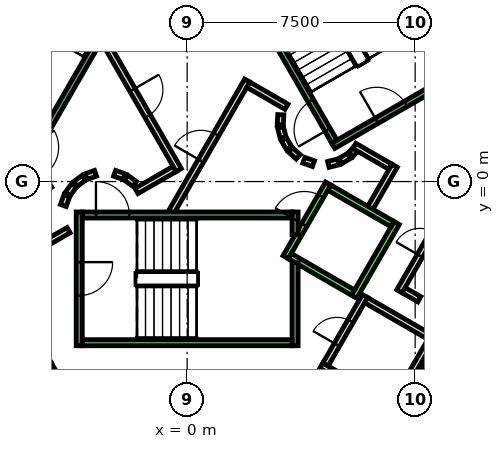
"""IFC4 building model, lengths in metres.
Left out: names, types, materials, properties, quantities, classifications, styles, units other than length and angle.
Written with IfcOpenShell. Run it as: python <this file> out.ifc"""

import sys

from ifc_helpers import new_model, si_unit, direction, frame, frame_2d, origin, place, context, subcontext, project, spatial, polyline, rectangle, outline, extrude, element, fill, save


model = new_model("IFC4")
c1 = context("Model", 3, precision=1e-05, world=origin(), true_north=direction((0.0, 1.0)))
c2 = subcontext(c1, "Body", "Model", "MODEL_VIEW")
j1 = project(units=[si_unit("LENGTHUNIT", "METRE"), si_unit("PLANEANGLEUNIT", "RADIAN")], contexts=[c1])
p1 = place(None, origin())
s1 = spatial("IfcSite", under=j1, at=p1, CompositionType="ELEMENT")
p2 = place(p1, origin())
s2 = spatial("IfcBuilding", under=s1, at=p2, CompositionType="ELEMENT")
p3 = place(p2, frame((0.0, 0.0, -11.0)))
s3 = spatial("IfcBuildingStorey", under=s2, at=p3, CompositionType="ELEMENT", Elevation=-11.0)
p4 = place(p3, frame((0.0, 0.0, -0.42)))
e1 = element("IfcWall", 1, at=p4, inside=s3, PredefinedType="SHEAR", context=c2, shape_type="SweptSolid", body=[
    extrude(outline(polyline([(8.517, 11.748), (7.651, 11.248), (12.702, 2.5), (13.856, 2.5), (8.517, 11.748)])), origin(), (0.0, 0.0, 1.0), 5.5),
])
p5 = place(p3, frame((0.0, 0.0, -0.42)))
e2 = element("IfcWall", 2, at=p5, inside=s3, PredefinedType="SHEAR", context=c2, shape_type="SweptSolid", body=[
    extrude(outline(polyline([(6.928, -9.5), (13.856, 2.5), (12.702, 2.5), (6.351, -8.5), (6.928, -9.5)])), origin(), (0.0, 0.0, 1.0), 5.5),
])
p6 = place(p3, frame((6.84, -7.453, 0.0), z_axis=(0.0, 0.0, 1.0), x_axis=(-0.866056369097, 0.49994636267, 0.0)))
e3 = element("IfcWall", 3, at=p6, inside=s3, PredefinedType="PARTITIONING", context=c2, shape_type="SweptSolid", body=[
    extrude(rectangle(XDim=2.8, YDim=0.2, at=frame_2d((1.4, 0.0))), origin(), (0.0, 0.0, 1.0), 5.05),
])
p7 = place(p3, frame((4.551, -6.017, 0.0), z_axis=(0.0, 0.0, 1.0), x_axis=(0.499925626596, 0.866068339032, 0.0)))
e4 = element("IfcWall", 4, at=p7, inside=s3, PredefinedType="PARTITIONING", context=c2, shape_type="SweptSolid", body=[
    extrude(rectangle(XDim=2.601, YDim=0.2, at=frame_2d((1.3, 0.0))), origin(), (0.0, 0.0, 1.0), 5.05),
])
p8 = place(p7, frame((0.75, 0.0, 0.0)))
e5 = element("IfcOpeningElement", 5, at=p8, cuts=e4, PredefinedType="OPENING", context=c2, shape_type="SweptSolid", body=[
    extrude(rectangle(XDim=0.9, YDim=2.1, at=frame_2d((0.45, 1.05))), frame((0.0, 0.11, 0.0), z_axis=(0.0, -1.0, 0.0), x_axis=(1.0, 0.0, 0.0)), (0.0, 0.0, 1.0), 0.22),
])
p9 = place(p3, frame((5.888, -3.902, 0.0), z_axis=(0.0, 0.0, 1.0), x_axis=(0.866022959057, -0.500004234368, 0.0)))
e6 = element("IfcWall", 6, at=p9, inside=s3, PredefinedType="PARTITIONING", context=c2, shape_type="SweptSolid", body=[
    extrude(rectangle(XDim=2.5, YDim=0.2, at=frame_2d((1.25, 0.0))), origin(), (0.0, 0.0, 1.0), 5.05),
])
p10 = place(p3, frame((8.103, -5.065, 0.0), z_axis=(0.0, 0.0, 1.0), x_axis=(-0.49996627774, -0.866044872465, 0.0)))
e7 = element("IfcWall", 7, at=p10, inside=s3, PredefinedType="PARTITIONING", context=c2, shape_type="SweptSolid", body=[
    extrude(rectangle(XDim=2.6, YDim=0.2, at=frame_2d((1.3, 0.0))), origin(), (0.0, 0.0, 1.0), 5.05),
])
p11 = place(p3, frame((7.637, -3.872, 0.0), z_axis=(0.0, 0.0, 1.0), x_axis=(-0.866158505053, 0.499769390944, 0.0)))
e8 = element("IfcWall", 8, at=p11, inside=s3, PredefinedType="PARTITIONING", context=c2, shape_type="SweptSolid", body=[
    extrude(rectangle(XDim=0.6, YDim=0.2, at=frame_2d((0.3, 0.0))), origin(), (0.0, 0.0, 1.0), 5.05),
])
p12 = place(p3, frame((6.981, -3.609, 0.0), z_axis=(0.0, 0.0, 1.0), x_axis=(0.499982693035, 0.866035395735, 0.0)))
e9 = element("IfcWall", 9, at=p12, inside=s3, PredefinedType="PARTITIONING", context=c2, shape_type="SweptSolid", body=[
    extrude(rectangle(XDim=3.6, YDim=0.2, at=frame_2d((1.8, 0.0))), origin(), (0.0, 0.0, 1.0), 5.05),
])
p13 = place(p12, frame((1.35, 0.0, 0.0)))
e10 = element("IfcOpeningElement", 10, at=p13, cuts=e9, PredefinedType="OPENING", context=c2, shape_type="SweptSolid", body=[
    extrude(rectangle(XDim=0.9, YDim=2.1, at=frame_2d((0.45, 1.05))), frame((0.0, 0.11, 0.0), z_axis=(0.0, -1.0, 0.0), x_axis=(1.0, 0.0, 0.0)), (0.0, 0.0, 1.0), 0.22),
])
p14 = place(p3, frame((-4.415, -6.053, 0.0), z_axis=(0.0, 0.0, 1.0), x_axis=(-0.866056369097, -0.49994636267, 0.0)))
e11 = element("IfcWall", 11, at=p14, inside=s3, PredefinedType="PARTITIONING", context=c2, shape_type="SweptSolid", body=[
    extrude(rectangle(XDim=2.8, YDim=0.2, at=frame_2d((1.4, 0.0))), origin(), (0.0, 0.0, 1.0), 5.05),
])
p15 = place(p3, frame((3.079, 2.199, 0.0), z_axis=(0.0, 0.0, 1.0), x_axis=(-0.047771483479, -0.998858290933, 0.0)))
e12 = element("IfcWall", 12, at=p15, inside=s3, PredefinedType="PARTITIONING", context=c2, shape_type="SweptSolid", body=[
    extrude(rectangle(XDim=0.337, YDim=0.2, at=frame_2d((0.169, 0.0))), origin(), (0.0, 0.0, 1.0), 5.05),
])
p16 = place(p3, frame((3.07, 1.786, 0.0), z_axis=(0.0, 0.0, 1.0), x_axis=(0.242705583207, -0.970099994784, 0.0)))
e13 = element("IfcWall", 13, at=p16, inside=s3, PredefinedType="PARTITIONING", context=c2, shape_type="SweptSolid", body=[
    extrude(rectangle(XDim=0.338, YDim=0.2, at=frame_2d((0.169, 0.0))), origin(), (0.0, 0.0, 1.0), 5.05),
])
for number, where, z_axis, x_axis in (
    (14, (3.182, 1.388, 0.0), (0.0, 0.0, 1.0), (0.512, -0.859, 0.0)),
    (15, (3.404, 1.039, 0.0), (0.0, 0.0, 1.0), (0.74, -0.672, 0.0)),
):
    element("IfcWall", number, at=place(p3, frame(where, z_axis=z_axis, x_axis=x_axis)), inside=s3, PredefinedType="PARTITIONING", context=c2, shape_type="SweptSolid", body=[
        extrude(rectangle(XDim=0.338, YDim=0.2, at=frame_2d((0.169, 0.0))), origin(), (0.0, 0.0, 1.0), 5.05),
    ])
p17 = place(p3, frame((3.838, 0.702, 0.0), z_axis=(0.0, 0.0, 1.0), x_axis=(0.941035081519, -0.338308993895, 0.0)))
e16 = element("IfcWall", 16, at=p17, inside=s3, PredefinedType="PARTITIONING", context=c2, shape_type="SweptSolid", body=[
    extrude(rectangle(XDim=0.337, YDim=0.2, at=frame_2d((0.168, 0.0))), origin(), (0.0, 0.0, 1.0), 5.05),
])
p18 = place(p3, frame((4.644, 0.564, 0.0), z_axis=(0.0, 0.0, 1.0), x_axis=(0.969929076366, 0.243387729394, 0.0)))
e17 = element("IfcWall", 17, at=p18, inside=s3, PredefinedType="PARTITIONING", context=c2, shape_type="SweptSolid", body=[
    extrude(rectangle(XDim=0.337, YDim=0.2, at=frame_2d((0.168, 0.0))), origin(), (0.0, 0.0, 1.0), 5.05),
])
p19 = place(p3, frame((5.042, 0.676, 0.0), z_axis=(0.0, 0.0, 1.0), x_axis=(0.857940155512, 0.513749637042, 0.0)))
e18 = element("IfcWall", 18, at=p19, inside=s3, PredefinedType="PARTITIONING", context=c2, shape_type="SweptSolid", body=[
    extrude(rectangle(XDim=0.337, YDim=0.2, at=frame_2d((0.168, 0.0))), origin(), (0.0, 0.0, 1.0), 5.05),
])
p20 = place(p3, frame((5.39, 0.898, 0.0), z_axis=(0.0, 0.0, 1.0), x_axis=(0.673828488714, 0.738887791073, 0.0)))
e19 = element("IfcWall", 19, at=p20, inside=s3, PredefinedType="PARTITIONING", context=c2, shape_type="SweptSolid", body=[
    extrude(rectangle(XDim=0.263, YDim=0.2, at=frame_2d((0.131, 0.0))), origin(), (0.0, 0.0, 1.0), 5.05),
])
p21 = place(p3, frame((5.499, 1.172, 0.0), z_axis=(0.0, 0.0, 1.0), x_axis=(0.866333505267, -0.499465972466, 0.0)))
e20 = element("IfcWall", 20, at=p21, inside=s3, PredefinedType="PARTITIONING", context=c2, shape_type="SweptSolid", body=[
    extrude(rectangle(XDim=1.374, YDim=0.2, at=frame_2d((0.687, 0.0))), origin(), (0.0, 0.0, 1.0), 5.05),
])
p22 = place(p3, frame((6.826, 0.522, 0.0), z_axis=(0.0, 0.0, 1.0), x_axis=(-0.500016722714, -0.866015748706, 0.0)))
e21 = element("IfcWall", 21, at=p22, inside=s3, PredefinedType="PARTITIONING", context=c2, shape_type="SweptSolid", body=[
    extrude(rectangle(XDim=1.7, YDim=0.2, at=frame_2d((0.85, 0.0))), origin(), (0.0, 0.0, 1.0), 5.05),
])
p23 = place(p3, frame((-0.52, -1.0, 0.0), z_axis=(0.0, 0.0, 1.0), x_axis=(0.50011622646, 0.865958290007, 0.0)))
e22 = element("IfcWall", 22, at=p23, inside=s3, PredefinedType="PARTITIONING", context=c2, shape_type="SweptSolid", body=[
    extrude(rectangle(XDim=4.991, YDim=0.2, at=frame_2d((2.496, 0.0))), origin(), (0.0, 0.0, 1.0), 5.05),
])
p24 = place(p23, frame((1.945, 0.0, 0.0)))
e23 = element("IfcOpeningElement", 23, at=p24, cuts=e22, PredefinedType="OPENING", context=c2, shape_type="SweptSolid", body=[
    extrude(rectangle(XDim=1.0, YDim=2.1, at=frame_2d((0.5, 1.05))), frame((0.0, 0.11, 0.0), z_axis=(0.0, -1.0, 0.0), x_axis=(1.0, 0.0, 0.0)), (0.0, 0.0, 1.0), 0.22),
])
p25 = place(p3, frame((2.012, 3.186, 0.0), z_axis=(0.0, 0.0, 1.0), x_axis=(0.865891012941, -0.500232699559, 0.0)))
e24 = element("IfcWall", 24, at=p25, inside=s3, PredefinedType="PARTITIONING", context=c2, shape_type="SweptSolid", body=[
    extrude(rectangle(XDim=1.449, YDim=0.2, at=frame_2d((0.725, 0.0))), origin(), (0.0, 0.0, 1.0), 5.05),
])
p26 = place(p3, frame((-0.412, 0.414, 0.0), z_axis=(0.0, 0.0, 1.0), x_axis=(-0.866017369001, -0.500013916395, 0.0)))
e25 = element("IfcWall", 25, at=p26, inside=s3, PredefinedType="PARTITIONING", context=c2, shape_type="SweptSolid", body=[
    extrude(rectangle(XDim=1.45, YDim=0.2, at=frame_2d((0.725, 0.0))), origin(), (0.0, 0.0, 1.0), 5.05),
])
p27 = place(p3, frame((-1.731, -0.077, 0.0), z_axis=(0.0, 0.0, 1.0), x_axis=(-0.804311165252, 0.594208338422, 0.0)))
e26 = element("IfcWall", 26, at=p27, inside=s3, PredefinedType="PARTITIONING", context=c2, shape_type="SweptSolid", body=[
    extrude(rectangle(XDim=0.338, YDim=0.2, at=frame_2d((0.169, 0.0))), origin(), (0.0, 0.0, 1.0), 5.05),
])
p28 = place(p3, frame((-2.07, 0.16, 0.0), z_axis=(0.0, 0.0, 1.0), x_axis=(-0.942199461132, 0.335052496547, 0.0)))
e27 = element("IfcWall", 27, at=p28, inside=s3, PredefinedType="PARTITIONING", context=c2, shape_type="SweptSolid", body=[
    extrude(rectangle(XDim=0.337, YDim=0.2, at=frame_2d((0.169, 0.0))), origin(), (0.0, 0.0, 1.0), 5.05),
])
p29 = place(p3, frame((-3.012, 0.273, 0.0), z_axis=(0.0, 0.0, 1.0), x_axis=(-0.942280615813, -0.334824194261, 0.0)))
e28 = element("IfcWall", 28, at=p29, inside=s3, PredefinedType="PARTITIONING", context=c2, shape_type="SweptSolid", body=[
    extrude(rectangle(XDim=0.338, YDim=0.2, at=frame_2d((0.169, 0.0))), origin(), (0.0, 0.0, 1.0), 5.05),
])
p30 = place(p3, frame((-3.397, 0.124, 0.0), z_axis=(0.0, 0.0, 1.0), x_axis=(-0.804311165252, -0.594208338422, 0.0)))
e29 = element("IfcWall", 29, at=p30, inside=s3, PredefinedType="PARTITIONING", context=c2, shape_type="SweptSolid", body=[
    extrude(rectangle(XDim=0.338, YDim=0.2, at=frame_2d((0.169, 0.0))), origin(), (0.0, 0.0, 1.0), 5.05),
])
p31 = place(p3, frame((-3.723, -0.131, 0.0), z_axis=(0.0, 0.0, 1.0), x_axis=(-0.594675113454, -0.803966112121, 0.0)))
e30 = element("IfcWall", 30, at=p31, inside=s3, PredefinedType="PARTITIONING", context=c2, shape_type="SweptSolid", body=[
    extrude(rectangle(XDim=0.338, YDim=0.2, at=frame_2d((0.169, 0.0))), origin(), (0.0, 0.0, 1.0), 5.05),
])
p32 = place(p3, frame((-3.96, -0.47, 0.0), z_axis=(0.0, 0.0, 1.0), x_axis=(-0.334824194261, -0.942280615813, 0.0)))
e31 = element("IfcWall", 31, at=p32, inside=s3, PredefinedType="PARTITIONING", context=c2, shape_type="SweptSolid", body=[
    extrude(rectangle(XDim=0.338, YDim=0.2, at=frame_2d((0.169, 0.0))), origin(), (0.0, 0.0, 1.0), 5.05),
])
p33 = place(p3, frame((-3.9, -1.599, 0.0), z_axis=(0.0, 0.0, 1.0), x_axis=(-0.865969445389, -0.500096910261, 0.0)))
e32 = element("IfcWall", 32, at=p33, inside=s3, PredefinedType="PARTITIONING", context=c2, shape_type="SweptSolid", body=[
    extrude(rectangle(XDim=1.373, YDim=0.2, at=frame_2d((0.687, 0.0))), origin(), (0.0, 0.0, 1.0), 5.05),
])
p34 = place(p3, frame((-2.771, 4.7, 0.0), z_axis=(0.0, 0.0, 1.0), x_axis=(0.499969479948, -0.866043023828, 0.0)))
e33 = element("IfcWall", 33, at=p34, inside=s3, PredefinedType="PARTITIONING", context=c2, shape_type="SweptSolid", body=[
    extrude(rectangle(XDim=4.99, YDim=0.2, at=frame_2d((2.495, 0.0))), origin(), (0.0, 0.0, 1.0), 5.05),
])
p35 = place(p34, frame((1.945, 0.0, 0.0)))
e34 = element("IfcOpeningElement", 34, at=p35, cuts=e33, PredefinedType="OPENING", context=c2, shape_type="SweptSolid", body=[
    extrude(rectangle(XDim=1.0, YDim=2.1, at=frame_2d((0.5, 1.05))), frame((0.0, 0.11, 0.0), z_axis=(0.0, -1.0, 0.0), x_axis=(1.0, 0.0, 0.0)), (0.0, 0.0, 1.0), 0.22),
])
p36 = place(p3, frame((3.24, -2.488, 0.0), z_axis=(0.0, 0.0, 1.0), x_axis=(0.49994636267, 0.866056369097, 0.0)))
e35 = element("IfcWall", 35, at=p36, inside=s3, PredefinedType="STANDARD", context=c2, shape_type="SweptSolid", body=[
    extrude(rectangle(XDim=2.8, YDim=0.2, at=frame_2d((1.4, 0.0))), origin(), (0.0, 0.0, 1.0), 5.05),
])
p37 = place(p36, frame((1.225, 0.0, 0.0)))
e36 = element("IfcOpeningElement", 36, at=p37, cuts=e35, PredefinedType="OPENING", context=c2, shape_type="SweptSolid", body=[
    extrude(rectangle(XDim=1.1, YDim=2.1, at=frame_2d((0.55, 1.05))), frame((0.0, 0.11, 0.0), z_axis=(0.0, -1.0, 0.0), x_axis=(1.0, 0.0, 0.0)), (0.0, 0.0, 1.0), 0.22),
])
p38 = place(p3, frame((5.492, -3.788, 0.0), z_axis=(0.0, 0.0, 1.0), x_axis=(0.500011755427, 0.866018616679, 0.0)))
e37 = element("IfcWall", 37, at=p38, inside=s3, PredefinedType="STANDARD", context=c2, shape_type="SweptSolid", body=[
    extrude(rectangle(XDim=2.8, YDim=0.2, at=frame_2d((1.4, 0.0))), origin(), (0.0, 0.0, 1.0), 5.05),
])
p39 = place(p3, frame((3.377, -2.452, 0.0), z_axis=(0.0, 0.0, 1.0), x_axis=(0.865955154139, -0.50012165622, 0.0)))
e38 = element("IfcWall", 38, at=p39, inside=s3, PredefinedType="STANDARD", context=c2, shape_type="SweptSolid", body=[
    extrude(rectangle(XDim=2.4, YDim=0.2, at=frame_2d((1.2, 0.0))), origin(), (0.0, 0.0, 1.0), 5.05),
])
p40 = place(p3, frame((4.677, -0.2, 0.0), z_axis=(0.0, 0.0, 1.0), x_axis=(0.865973769406, -0.500089422704, 0.0)))
e39 = element("IfcWall", 39, at=p40, inside=s3, PredefinedType="STANDARD", context=c2, shape_type="SweptSolid", body=[
    extrude(rectangle(XDim=2.399, YDim=0.2, at=frame_2d((1.2, 0.0))), origin(), (0.0, 0.0, 1.0), 5.05),
])
p41 = place(p3, frame((-3.55, -1.0, 0.0), z_axis=(0.0, 0.0, 1.0), x_axis=(0.0, -1.0, 0.0)))
e40 = element("IfcWall", 40, at=p41, inside=s3, PredefinedType="STANDARD", context=c2, shape_type="SweptSolid", body=[
    extrude(rectangle(XDim=4.4, YDim=0.2, at=frame_2d((2.2, 0.0))), origin(), (0.0, 0.0, 1.0), 5.05),
])
p42 = place(p41, frame((1.65, 0.0, 0.0)))
e41 = element("IfcOpeningElement", 41, at=p42, cuts=e40, PredefinedType="OPENING", context=c2, shape_type="SweptSolid", body=[
    extrude(rectangle(XDim=1.1, YDim=2.2, at=frame_2d((0.55, 1.1))), frame((0.0, 0.11, 0.0), z_axis=(0.0, -1.0, 0.0), x_axis=(1.0, 0.0, 0.0)), (0.0, 0.0, 1.0), 0.22),
])
p43 = place(p3, frame((3.55, -2.667, 0.0), z_axis=(0.0, 0.0, 1.0), x_axis=(0.0, -1.0, 0.0)))
e42 = element("IfcWall", 42, at=p43, inside=s3, PredefinedType="STANDARD", context=c2, shape_type="SweptSolid", body=[
    extrude(rectangle(XDim=2.733, YDim=0.2, at=frame_2d((1.366, 0.0))), origin(), (0.0, 0.0, 1.0), 5.05),
])
p44 = place(p3, frame((3.55, -1.0, 0.0), z_axis=(0.0, 0.0, 1.0), x_axis=(0.0, -1.0, 0.0)))
e43 = element("IfcWall", 43, at=p44, inside=s3, PredefinedType="STANDARD", context=c2, shape_type="SweptSolid", body=[
    extrude(rectangle(XDim=0.751, YDim=0.2, at=frame_2d((0.375, 0.0))), origin(), (0.0, 0.0, 1.0), 5.05),
])
p45 = place(p3, frame((-3.45, -1.1, 0.0), z_axis=(0.0, 0.0, 1.0), x_axis=(1.0, 0.0, 0.0)))
e44 = element("IfcWall", 44, at=p45, inside=s3, PredefinedType="STANDARD", context=c2, shape_type="SweptSolid", body=[
    extrude(rectangle(XDim=6.9, YDim=0.2, at=frame_2d((3.45, 0.0))), origin(), (0.0, 0.0, 1.0), 5.05),
])
p46 = place(p45, frame((0.45, 0.0, 0.0)))
e45 = element("IfcOpeningElement", 45, at=p46, cuts=e44, PredefinedType="OPENING", context=c2, shape_type="SweptSolid", body=[
    extrude(rectangle(XDim=1.1, YDim=2.2, at=frame_2d((0.55, 1.1))), frame((0.0, 0.11, 0.0), z_axis=(0.0, -1.0, 0.0), x_axis=(1.0, 0.0, 0.0)), (0.0, 0.0, 1.0), 0.22),
])
p47 = place(p3, frame((-3.45, -5.3, 0.0), z_axis=(0.0, 0.0, 1.0), x_axis=(1.0, 0.0, 0.0)))
e46 = element("IfcWall", 46, at=p47, inside=s3, PredefinedType="STANDARD", context=c2, shape_type="SweptSolid", body=[
    extrude(rectangle(XDim=6.9, YDim=0.2, at=frame_2d((3.45, 0.0))), origin(), (0.0, 0.0, 1.0), 5.05),
])
p48 = place(p3, frame((4.806, 1.176, 0.0), z_axis=(0.0, 0.0, 1.0), x_axis=(0.866059941101, 0.499940174841, 0.0)))
e47 = element("IfcWall", 47, at=p48, inside=s3, PredefinedType="STANDARD", context=c2, shape_type="SweptSolid", body=[
    extrude(rectangle(XDim=4.4, YDim=0.2, at=frame_2d((2.2, 0.0))), origin(), (0.0, 0.0, 1.0), 5.05),
])
p49 = place(p48, frame((1.65, 0.0, 0.0)))
e48 = element("IfcOpeningElement", 48, at=p49, cuts=e47, PredefinedType="OPENING", context=c2, shape_type="SweptSolid", body=[
    extrude(rectangle(XDim=1.1, YDim=2.2, at=frame_2d((0.55, 1.1))), frame((0.0, 0.11, 0.0), z_axis=(0.0, -1.0, 0.0), x_axis=(1.0, 0.0, 0.0)), (0.0, 0.0, 1.0), 0.22),
])
p50 = place(p3, frame((4.843, 1.312, 0.0), z_axis=(0.0, 0.0, 1.0), x_axis=(-0.499963383562, 0.866046543262, 0.0)))
e49 = element("IfcWall", 49, at=p50, inside=s3, PredefinedType="STANDARD", context=c2, shape_type="SweptSolid", body=[
    extrude(rectangle(XDim=6.9, YDim=0.2, at=frame_2d((3.45, 0.0))), origin(), (0.0, 0.0, 1.0), 5.05),
])
p51 = place(p50, frame((0.45, 0.0, 0.0)))
e50 = element("IfcOpeningElement", 50, at=p51, cuts=e49, PredefinedType="OPENING", context=c2, shape_type="SweptSolid", body=[
    extrude(rectangle(XDim=1.1, YDim=2.2, at=frame_2d((0.55, 1.1))), frame((0.0, 0.11, 0.0), z_axis=(0.0, -1.0, 0.0), x_axis=(1.0, 0.0, 0.0)), (0.0, 0.0, 1.0), 0.22),
])
p52 = place(p3, frame((8.48, 3.412, 0.0), z_axis=(0.0, 0.0, 1.0), x_axis=(-0.499978703459, 0.866037698999, 0.0)))
e51 = element("IfcWall", 51, at=p52, inside=s3, PredefinedType="STANDARD", context=c2, shape_type="SweptSolid", body=[
    extrude(rectangle(XDim=6.9, YDim=0.2, at=frame_2d((3.45, 0.0))), origin(), (0.0, 0.0, 1.0), 5.05),
])
p53 = place(p3, frame((-1.393, 7.288, 0.0), z_axis=(0.0, 0.0, 1.0), x_axis=(-0.499963383562, -0.866046543262, 0.0)))
e52 = element("IfcWall", 52, at=p53, inside=s3, PredefinedType="STANDARD", context=c2, shape_type="SweptSolid", body=[
    extrude(rectangle(XDim=6.9, YDim=0.2, at=frame_2d((3.45, 0.0))), origin(), (0.0, 0.0, 1.0), 5.05),
])
p54 = place(p53, frame((0.45, 0.0, 0.0)))
e53 = element("IfcOpeningElement", 53, at=p54, cuts=e52, PredefinedType="OPENING", context=c2, shape_type="SweptSolid", body=[
    extrude(rectangle(XDim=1.1, YDim=2.2, at=frame_2d((0.55, 1.1))), frame((0.0, 0.11, 0.0), z_axis=(0.0, -1.0, 0.0), x_axis=(1.0, 0.0, 0.0)), (0.0, 0.0, 1.0), 0.22),
])
p55 = place(p24, origin())
e54 = element("IfcDoor", 54, at=p55, inside=s3, OperationType="SINGLE_SWING_LEFT", PredefinedType="DOOR", context=c2, shape_type="SweptSolid", body=[
    extrude(rectangle(XDim=1.0, YDim=2.1, at=frame_2d((0.5, 1.05))), frame((0.0, 0.025, 0.0), z_axis=(0.0, -1.0, 0.0), x_axis=(1.0, 0.0, 0.0)), (0.0, 0.0, 1.0), 0.05),
])
fill(e23, e54)
p56 = place(p35, origin())
e55 = element("IfcDoor", 55, at=p56, inside=s3, OperationType="SINGLE_SWING_RIGHT", PredefinedType="DOOR", context=c2, shape_type="SweptSolid", body=[
    extrude(rectangle(XDim=1.0, YDim=2.1, at=frame_2d((0.5, 1.05))), frame((0.0, 0.025, 0.0), z_axis=(0.0, -1.0, 0.0), x_axis=(1.0, 0.0, 0.0)), (0.0, 0.0, 1.0), 0.05),
])
fill(e34, e55)
p57 = place(p8, origin())
e56 = element("IfcDoor", 56, at=p57, inside=s3, OperationType="SINGLE_SWING_RIGHT", PredefinedType="DOOR", context=c2, shape_type="SweptSolid", body=[
    extrude(rectangle(XDim=0.9, YDim=2.1, at=frame_2d((0.45, 1.05))), frame((0.0, 0.025, 0.0), z_axis=(0.0, -1.0, 0.0), x_axis=(1.0, 0.0, 0.0)), (0.0, 0.0, 1.0), 0.05),
])
fill(e5, e56)
p58 = place(p13, origin())
e57 = element("IfcDoor", 57, at=p58, inside=s3, OperationType="SINGLE_SWING_RIGHT", PredefinedType="DOOR", context=c2, shape_type="SweptSolid", body=[
    extrude(rectangle(XDim=0.9, YDim=2.1, at=frame_2d((0.45, 1.05))), frame((0.0, 0.025, 0.0), z_axis=(0.0, -1.0, 0.0), x_axis=(1.0, 0.0, 0.0)), (0.0, 0.0, 1.0), 0.05),
])
fill(e10, e57)
p59 = place(p37, origin())
e58 = element("IfcDoor", 58, at=p59, inside=s3, OperationType="SLIDING_TO_LEFT", PredefinedType="DOOR", context=c2, shape_type="SweptSolid", body=[
    extrude(rectangle(XDim=1.1, YDim=2.1, at=frame_2d((0.55, 1.05))), frame((0.0, 0.025, 0.0), z_axis=(0.0, -1.0, 0.0), x_axis=(1.0, 0.0, 0.0)), (0.0, 0.0, 1.0), 0.05),
])
fill(e36, e58)
p60 = place(p46, origin())
e59 = element("IfcDoor", 59, at=p60, inside=s3, OperationType="SINGLE_SWING_LEFT", PredefinedType="DOOR", context=c2, shape_type="SweptSolid", body=[
    extrude(rectangle(XDim=1.1, YDim=2.2, at=frame_2d((0.55, 1.1))), frame((0.0, 0.025, 0.0), z_axis=(0.0, -1.0, 0.0), x_axis=(1.0, 0.0, 0.0)), (0.0, 0.0, 1.0), 0.05),
])
fill(e45, e59)
p61 = place(p42, origin())
e60 = element("IfcDoor", 60, at=p61, inside=s3, OperationType="SINGLE_SWING_LEFT", PredefinedType="DOOR", context=c2, shape_type="SweptSolid", body=[
    extrude(rectangle(XDim=1.1, YDim=2.2, at=frame_2d((0.55, 1.1))), frame((0.0, 0.025, 0.0), z_axis=(0.0, -1.0, 0.0), x_axis=(1.0, 0.0, 0.0)), (0.0, 0.0, 1.0), 0.05),
])
fill(e41, e60)
p62 = place(p51, origin())
e61 = element("IfcDoor", 61, at=p62, inside=s3, OperationType="SINGLE_SWING_LEFT", PredefinedType="DOOR", context=c2, shape_type="SweptSolid", body=[
    extrude(rectangle(XDim=1.1, YDim=2.2, at=frame_2d((0.55, 1.1))), frame((0.0, 0.025, 0.0), z_axis=(0.0, -1.0, 0.0), x_axis=(1.0, 0.0, 0.0)), (0.0, 0.0, 1.0), 0.05),
])
fill(e50, e61)
p63 = place(p49, origin())
e62 = element("IfcDoor", 62, at=p63, inside=s3, OperationType="SINGLE_SWING_LEFT", PredefinedType="DOOR", context=c2, shape_type="SweptSolid", body=[
    extrude(rectangle(XDim=1.1, YDim=2.2, at=frame_2d((0.55, 1.1))), frame((0.0, 0.025, 0.0), z_axis=(0.0, -1.0, 0.0), x_axis=(1.0, 0.0, 0.0)), (0.0, 0.0, 1.0), 0.05),
])
fill(e48, e62)
save(model, sys.argv[1])
